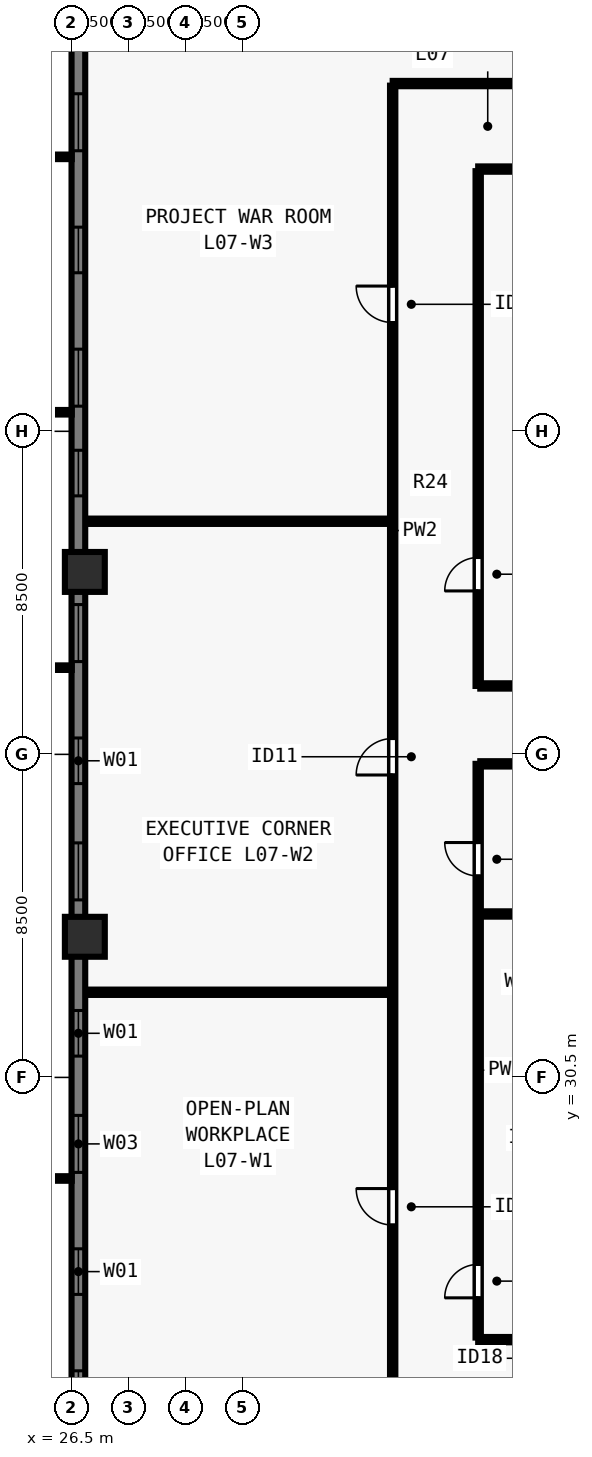
"""IFC4 building model, lengths in metres.
Left out: names, types, materials, properties, quantities, classifications, styles, units other than length and angle.
Written with IfcOpenShell. Run it as: python <this file> out.ifc"""

import sys

from ifc_helpers import new_model, si_unit, direction, frame, frame_2d, origin, origin_2d, place, context, subcontext, project, spatial, rectangle, extrude, element, fill, save


model = new_model("IFC4")
c1 = context("Model", 3, precision=1e-05, world=origin(), true_north=direction((0.0, 1.0)))
c2 = subcontext(c1, "Body", "Model", "MODEL_VIEW")
j1 = project(units=[si_unit("LENGTHUNIT", "METRE"), si_unit("PLANEANGLEUNIT", "RADIAN")], contexts=[c1])
p1 = place(None, origin())
s1 = spatial("IfcSite", under=j1, at=p1, CompositionType="ELEMENT")
p2 = place(p1, origin())
s2 = spatial("IfcBuilding", under=s1, at=p2, CompositionType="ELEMENT")
p3 = place(p2, frame((0.0, 0.0, 30.5)))
s3 = spatial("IfcBuildingStorey", under=s2, at=p3, CompositionType="ELEMENT", Elevation=30.5)
for number, where, z_axis, x_axis in (
    (1, (26.85, 43.8, 0.0), (0.0, 0.0, 1.0), (0.0, 1.0, 0.0)),
    (2, (26.85, 34.2, 0.0), (0.0, 0.0, 1.0), (0.0, 1.0, 0.0)),
):
    element("IfcColumn", number, at=place(p3, frame(where, z_axis=z_axis, x_axis=x_axis)), inside=s3, PredefinedType="COLUMN", context=c2, shape_type="SweptSolid", body=[
        extrude(rectangle(XDim=1.05, YDim=1.05, at=origin_2d()), origin(), (0.0, 0.0, 1.0), 3.5),
    ])
p4 = place(p3, frame((26.68, 16.5, 0.0), z_axis=(0.0, 0.0, 1.0), x_axis=(0.0, 1.0, 0.0)))
e3 = element("IfcWall", 3, at=p4, inside=s3, PredefinedType="SOLIDWALL", context=c2, shape_type="SweptSolid", body=[
    extrude(rectangle(XDim=44.662, YDim=0.36, at=frame_2d((22.331, 0.0))), origin(), (0.0, 0.0, 1.0), 3.28),
])
p5 = place(p4, frame((4.78, 0.0, 0.8)))
e4 = element("IfcOpeningElement", 4, at=p5, cuts=e3, PredefinedType="OPENING", context=c2, shape_type="SweptSolid", body=[
    extrude(rectangle(XDim=1.5, YDim=1.544, at=frame_2d((0.75, 0.772))), frame((0.0, 0.19, 0.0), z_axis=(0.0, -1.0, 0.0), x_axis=(1.0, 0.0, 0.0)), (0.0, 0.0, 1.0), 0.38),
])
p6 = place(p4, frame((8.29, 0.0, 0.8)))
e5 = element("IfcOpeningElement", 5, at=p6, cuts=e3, PredefinedType="OPENING", context=c2, shape_type="SweptSolid", body=[
    extrude(rectangle(XDim=1.2, YDim=1.544, at=frame_2d((0.6, 0.772))), frame((0.0, 0.19, 0.0), z_axis=(0.0, -1.0, 0.0), x_axis=(1.0, 0.0, 0.0)), (0.0, 0.0, 1.0), 0.38),
])
p7 = place(p4, frame((11.5, 0.0, 0.8)))
e6 = element("IfcOpeningElement", 6, at=p7, cuts=e3, PredefinedType="OPENING", context=c2, shape_type="SweptSolid", body=[
    extrude(rectangle(XDim=1.5, YDim=1.544, at=frame_2d((0.75, 0.772))), frame((0.0, 0.19, 0.0), z_axis=(0.0, -1.0, 0.0), x_axis=(1.0, 0.0, 0.0)), (0.0, 0.0, 1.0), 0.38),
])
p8 = place(p4, frame((14.561, 0.0, 0.8)))
e7 = element("IfcOpeningElement", 7, at=p8, cuts=e3, PredefinedType="OPENING", context=c2, shape_type="SweptSolid", body=[
    extrude(rectangle(XDim=1.2, YDim=1.544, at=frame_2d((0.6, 0.772))), frame((0.0, 0.19, 0.0), z_axis=(0.0, -1.0, 0.0), x_axis=(1.0, 0.0, 0.0)), (0.0, 0.0, 1.0), 0.38),
])
p9 = place(p4, frame((18.671, 0.0, 0.8)))
e8 = element("IfcOpeningElement", 8, at=p9, cuts=e3, PredefinedType="OPENING", context=c2, shape_type="SweptSolid", body=[
    extrude(rectangle(XDim=1.5, YDim=1.544, at=frame_2d((0.75, 0.772))), frame((0.0, 0.19, 0.0), z_axis=(0.0, -1.0, 0.0), x_axis=(1.0, 0.0, 0.0)), (0.0, 0.0, 1.0), 0.38),
])
p10 = place(p4, frame((21.731, 0.0, 0.8)))
e9 = element("IfcOpeningElement", 9, at=p10, cuts=e3, PredefinedType="OPENING", context=c2, shape_type="SweptSolid", body=[
    extrude(rectangle(XDim=1.2, YDim=1.544, at=frame_2d((0.6, 0.772))), frame((0.0, 0.19, 0.0), z_axis=(0.0, -1.0, 0.0), x_axis=(1.0, 0.0, 0.0)), (0.0, 0.0, 1.0), 0.38),
])
p11 = place(p4, frame((24.941, 0.0, 0.8)))
e10 = element("IfcOpeningElement", 10, at=p11, cuts=e3, PredefinedType="OPENING", context=c2, shape_type="SweptSolid", body=[
    extrude(rectangle(XDim=1.5, YDim=1.544, at=frame_2d((0.75, 0.772))), frame((0.0, 0.19, 0.0), z_axis=(0.0, -1.0, 0.0), x_axis=(1.0, 0.0, 0.0)), (0.0, 0.0, 1.0), 0.38),
])
p12 = place(p4, frame((29.302, 0.0, 0.8)))
e11 = element("IfcOpeningElement", 11, at=p12, cuts=e3, PredefinedType="OPENING", context=c2, shape_type="SweptSolid", body=[
    extrude(rectangle(XDim=1.2, YDim=1.544, at=frame_2d((0.6, 0.772))), frame((0.0, 0.19, 0.0), z_axis=(0.0, -1.0, 0.0), x_axis=(1.0, 0.0, 0.0)), (0.0, 0.0, 1.0), 0.38),
])
p13 = place(p4, frame((31.662, 0.0, 0.8)))
e12 = element("IfcOpeningElement", 12, at=p13, cuts=e3, PredefinedType="OPENING", context=c2, shape_type="SweptSolid", body=[
    extrude(rectangle(XDim=1.5, YDim=1.544, at=frame_2d((0.75, 0.772))), frame((0.0, 0.19, 0.0), z_axis=(0.0, -1.0, 0.0), x_axis=(1.0, 0.0, 0.0)), (0.0, 0.0, 1.0), 0.38),
])
p14 = place(p4, frame((35.172, 0.0, 0.8)))
e13 = element("IfcOpeningElement", 13, at=p14, cuts=e3, PredefinedType="OPENING", context=c2, shape_type="SweptSolid", body=[
    extrude(rectangle(XDim=1.2, YDim=1.544, at=frame_2d((0.6, 0.772))), frame((0.0, 0.19, 0.0), z_axis=(0.0, -1.0, 0.0), x_axis=(1.0, 0.0, 0.0)), (0.0, 0.0, 1.0), 0.38),
])
p15 = place(p4, frame((38.382, 0.0, 0.8)))
e14 = element("IfcOpeningElement", 14, at=p15, cuts=e3, PredefinedType="OPENING", context=c2, shape_type="SweptSolid", body=[
    extrude(rectangle(XDim=1.5, YDim=1.544, at=frame_2d((0.75, 0.772))), frame((0.0, 0.19, 0.0), z_axis=(0.0, -1.0, 0.0), x_axis=(1.0, 0.0, 0.0)), (0.0, 0.0, 1.0), 0.38),
])
p16 = place(p3, frame((34.95, 56.65, 0.0), z_axis=(0.0, 0.0, 1.0), x_axis=(1.0, 0.0, 0.0)))
e15 = element("IfcWall", 15, at=p16, inside=s3, PredefinedType="PARTITIONING", context=c2, shape_type="SweptSolid", body=[
    extrude(rectangle(XDim=34.1, YDim=0.14, at=frame_2d((17.05, 0.0))), origin(), (0.0, 0.0, 1.0), 3.28),
])
p17 = place(p16, frame((4.522, 0.0, 0.0)))
e16 = element("IfcOpeningElement", 16, at=p17, cuts=e15, PredefinedType="OPENING", context=c2, shape_type="SweptSolid", body=[
    extrude(rectangle(XDim=0.96, YDim=2.12, at=frame_2d((0.48, 1.06))), frame((0.0, 0.08, 0.0), z_axis=(0.0, -1.0, 0.0), x_axis=(1.0, 0.0, 0.0)), (0.0, 0.0, 1.0), 0.16),
])
p18 = place(p16, frame((29.202, 0.0, 0.0)))
e17 = element("IfcOpeningElement", 17, at=p18, cuts=e15, PredefinedType="OPENING", context=c2, shape_type="SweptSolid", body=[
    extrude(rectangle(XDim=0.96, YDim=2.12, at=frame_2d((0.48, 1.06))), frame((0.0, 0.08, 0.0), z_axis=(0.0, -1.0, 0.0), x_axis=(1.0, 0.0, 0.0)), (0.0, 0.0, 1.0), 0.16),
])
p19 = place(p3, frame((34.95, 21.405, 0.0), z_axis=(0.0, 0.0, 1.0), x_axis=(0.0, 1.0, 0.0)))
e18 = element("IfcWall", 18, at=p19, inside=s3, PredefinedType="PARTITIONING", context=c2, shape_type="SweptSolid", body=[
    extrude(rectangle(XDim=35.19, YDim=0.14, at=frame_2d((17.595, 0.0))), origin(), (0.0, 0.0, 1.0), 3.28),
])
p20 = place(p19, frame((5.21, 0.0, 0.0)))
e19 = element("IfcOpeningElement", 19, at=p20, cuts=e18, PredefinedType="OPENING", context=c2, shape_type="SweptSolid", body=[
    extrude(rectangle(XDim=0.96, YDim=2.12, at=frame_2d((0.48, 1.06))), frame((0.0, 0.08, 0.0), z_axis=(0.0, -1.0, 0.0), x_axis=(1.0, 0.0, 0.0)), (0.0, 0.0, 1.0), 0.16),
])
p21 = place(p19, frame((17.052, 0.0, 0.0)))
e20 = element("IfcOpeningElement", 20, at=p21, cuts=e18, PredefinedType="OPENING", context=c2, shape_type="SweptSolid", body=[
    extrude(rectangle(XDim=0.96, YDim=2.12, at=frame_2d((0.48, 1.06))), frame((0.0, 0.08, 0.0), z_axis=(0.0, -1.0, 0.0), x_axis=(1.0, 0.0, 0.0)), (0.0, 0.0, 1.0), 0.16),
])
p22 = place(p19, frame((28.957, 0.0, 0.0)))
e21 = element("IfcOpeningElement", 21, at=p22, cuts=e18, PredefinedType="OPENING", context=c2, shape_type="SweptSolid", body=[
    extrude(rectangle(XDim=0.96, YDim=2.12, at=frame_2d((0.48, 1.06))), frame((0.0, 0.08, 0.0), z_axis=(0.0, -1.0, 0.0), x_axis=(1.0, 0.0, 0.0)), (0.0, 0.0, 1.0), 0.16),
])
p23 = place(p3, frame((37.2, 23.6, 0.0), z_axis=(0.0, 0.0, 1.0), x_axis=(1.0, 0.0, 0.0)))
e22 = element("IfcWall", 22, at=p23, inside=s3, PredefinedType="PARTITIONING", context=c2, shape_type="SweptSolid", body=[
    extrude(rectangle(XDim=29.6, YDim=0.14, at=frame_2d((14.8, 0.0))), origin(), (0.0, 0.0, 1.0), 3.28),
])
p24 = place(p23, frame((1.2, 0.0, 0.0)))
e23 = element("IfcOpeningElement", 23, at=p24, cuts=e22, PredefinedType="OPENING", context=c2, shape_type="SweptSolid", body=[
    extrude(rectangle(XDim=0.88, YDim=2.1, at=frame_2d((0.44, 1.05))), frame((0.0, 0.08, 0.0), z_axis=(0.0, -1.0, 0.0), x_axis=(1.0, 0.0, 0.0)), (0.0, 0.0, 1.0), 0.16),
])
p25 = place(p23, frame((11.3, 0.0, 0.0)))
e24 = element("IfcOpeningElement", 24, at=p25, cuts=e22, PredefinedType="OPENING", context=c2, shape_type="SweptSolid", body=[
    extrude(rectangle(XDim=0.88, YDim=2.1, at=frame_2d((0.44, 1.05))), frame((0.0, 0.08, 0.0), z_axis=(0.0, -1.0, 0.0), x_axis=(1.0, 0.0, 0.0)), (0.0, 0.0, 1.0), 0.16),
])
p26 = place(p23, frame((21.8, 0.0, 0.0)))
e25 = element("IfcOpeningElement", 25, at=p26, cuts=e22, PredefinedType="OPENING", context=c2, shape_type="SweptSolid", body=[
    extrude(rectangle(XDim=0.88, YDim=2.1, at=frame_2d((0.44, 1.05))), frame((0.0, 0.08, 0.0), z_axis=(0.0, -1.0, 0.0), x_axis=(1.0, 0.0, 0.0)), (0.0, 0.0, 1.0), 0.16),
])
p27 = place(p3, frame((37.2, 54.4, 0.0), z_axis=(0.0, 0.0, 1.0), x_axis=(1.0, 0.0, 0.0)))
e26 = element("IfcWall", 26, at=p27, inside=s3, PredefinedType="PARTITIONING", context=c2, shape_type="SweptSolid", body=[
    extrude(rectangle(XDim=29.6, YDim=0.14, at=frame_2d((14.8, 0.0))), origin(), (0.0, 0.0, 1.0), 3.28),
])
p28 = place(p27, frame((2.2, 0.0, 0.0)))
e27 = element("IfcOpeningElement", 27, at=p28, cuts=e26, PredefinedType="OPENING", context=c2, shape_type="SweptSolid", body=[
    extrude(rectangle(XDim=0.88, YDim=2.1, at=frame_2d((0.44, 1.05))), frame((0.0, 0.08, 0.0), z_axis=(0.0, -1.0, 0.0), x_axis=(1.0, 0.0, 0.0)), (0.0, 0.0, 1.0), 0.16),
])
p29 = place(p27, frame((15.3, 0.0, 0.0)))
e28 = element("IfcOpeningElement", 28, at=p29, cuts=e26, PredefinedType="OPENING", context=c2, shape_type="SweptSolid", body=[
    extrude(rectangle(XDim=0.88, YDim=2.1, at=frame_2d((0.44, 1.05))), frame((0.0, 0.08, 0.0), z_axis=(0.0, -1.0, 0.0), x_axis=(1.0, 0.0, 0.0)), (0.0, 0.0, 1.0), 0.16),
])
p30 = place(p27, frame((24.8, 0.0, 0.0)))
e29 = element("IfcOpeningElement", 29, at=p30, cuts=e26, PredefinedType="OPENING", context=c2, shape_type="SweptSolid", body=[
    extrude(rectangle(XDim=0.88, YDim=2.1, at=frame_2d((0.44, 1.05))), frame((0.0, 0.08, 0.0), z_axis=(0.0, -1.0, 0.0), x_axis=(1.0, 0.0, 0.0)), (0.0, 0.0, 1.0), 0.16),
])
p31 = place(p3, frame((37.2, 23.655, 0.0), z_axis=(0.0, 0.0, 1.0), x_axis=(0.0, 1.0, 0.0)))
e30 = element("IfcWall", 30, at=p31, inside=s3, PredefinedType="PARTITIONING", context=c2, shape_type="SweptSolid", body=[
    extrude(rectangle(XDim=15.095, YDim=0.14, at=frame_2d((7.547, 0.0))), origin(), (0.0, 0.0, 1.0), 3.28),
])
p32 = place(p31, frame((1.045, 0.0, 0.0)))
e31 = element("IfcOpeningElement", 31, at=p32, cuts=e30, PredefinedType="OPENING", context=c2, shape_type="SweptSolid", body=[
    extrude(rectangle(XDim=0.88, YDim=2.1, at=frame_2d((0.44, 1.05))), frame((0.0, 0.08, 0.0), z_axis=(0.0, -1.0, 0.0), x_axis=(1.0, 0.0, 0.0)), (0.0, 0.0, 1.0), 0.16),
])
p33 = place(p31, frame((12.145, 0.0, 0.0)))
e32 = element("IfcOpeningElement", 32, at=p33, cuts=e30, PredefinedType="OPENING", context=c2, shape_type="SweptSolid", body=[
    extrude(rectangle(XDim=0.88, YDim=2.1, at=frame_2d((0.44, 1.05))), frame((0.0, 0.08, 0.0), z_axis=(0.0, -1.0, 0.0), x_axis=(1.0, 0.0, 0.0)), (0.0, 0.0, 1.0), 0.16),
])
p34 = place(p3, frame((37.2, 40.8, 0.0), z_axis=(0.0, 0.0, 1.0), x_axis=(0.0, 1.0, 0.0)))
e33 = element("IfcWall", 33, at=p34, inside=s3, PredefinedType="PARTITIONING", context=c2, shape_type="SweptSolid", body=[
    extrude(rectangle(XDim=13.545, YDim=0.14, at=frame_2d((6.772, 0.0))), origin(), (0.0, 0.0, 1.0), 3.28),
])
p35 = place(p34, frame((2.5, 0.0, 0.0)))
e34 = element("IfcOpeningElement", 34, at=p35, cuts=e33, PredefinedType="OPENING", context=c2, shape_type="SweptSolid", body=[
    extrude(rectangle(XDim=0.88, YDim=2.1, at=frame_2d((0.44, 1.05))), frame((0.0, 0.08, 0.0), z_axis=(0.0, -1.0, 0.0), x_axis=(1.0, 0.0, 0.0)), (0.0, 0.0, 1.0), 0.16),
])
for number, where, z_axis, x_axis in (
    (35, (37.255, 38.75, 0.0), (0.0, 0.0, 1.0), (1.0, 0.0, 0.0)),
    (36, (37.255, 40.8, 0.0), (0.0, 0.0, 1.0), (1.0, 0.0, 0.0)),
    (37, (37.255, 34.8, 0.0), (0.0, 0.0, 1.0), (1.0, 0.0, 0.0)),
):
    element("IfcWall", number, at=place(p3, frame(where, z_axis=z_axis, x_axis=x_axis)), inside=s3, PredefinedType="PARTITIONING", context=c2, shape_type="SweptSolid", body=[
        extrude(rectangle(XDim=5.985, YDim=0.14, at=frame_2d((2.993, 0.0))), origin(), (0.0, 0.0, 1.0), 3.28),
    ])
for number, where, z_axis, x_axis in (
    (38, (26.92, 32.74, 0.0), (0.0, 0.0, 1.0), (1.0, 0.0, 0.0)),
    (39, (26.92, 45.134, 0.0), (0.0, 0.0, 1.0), (1.0, 0.0, 0.0)),
):
    element("IfcWall", number, at=place(p3, frame(where, z_axis=z_axis, x_axis=x_axis)), inside=s3, PredefinedType="PARTITIONING", context=c2, shape_type="SweptSolid", body=[
        extrude(rectangle(XDim=7.93, YDim=0.14, at=frame_2d((3.965, 0.0))), origin(), (0.0, 0.0, 1.0), 2.439),
    ])
p36 = place(p5, origin())
e40 = element("IfcWindow", 40, at=p36, inside=s3, PartitioningType="SINGLE_PANEL", PredefinedType="WINDOW", context=c2, shape_type="SweptSolid", body=[
    extrude(rectangle(XDim=1.5, YDim=1.544, at=frame_2d((0.75, 0.772))), frame((0.0, -0.05, 0.0), z_axis=(0.0, -1.0, 0.0), x_axis=(1.0, 0.0, 0.0)), (0.0, 0.0, 1.0), 0.06),
])
fill(e4, e40)
p37 = place(p6, origin())
e41 = element("IfcWindow", 41, at=p37, inside=s3, PartitioningType="SINGLE_PANEL", PredefinedType="WINDOW", context=c2, shape_type="SweptSolid", body=[
    extrude(rectangle(XDim=1.2, YDim=1.544, at=frame_2d((0.6, 0.772))), frame((0.0, -0.05, 0.0), z_axis=(0.0, -1.0, 0.0), x_axis=(1.0, 0.0, 0.0)), (0.0, 0.0, 1.0), 0.06),
])
fill(e5, e41)
p38 = place(p7, origin())
e42 = element("IfcWindow", 42, at=p38, inside=s3, PartitioningType="SINGLE_PANEL", PredefinedType="WINDOW", context=c2, shape_type="SweptSolid", body=[
    extrude(rectangle(XDim=1.5, YDim=1.544, at=frame_2d((0.75, 0.772))), frame((0.0, -0.05, 0.0), z_axis=(0.0, -1.0, 0.0), x_axis=(1.0, 0.0, 0.0)), (0.0, 0.0, 1.0), 0.06),
])
fill(e6, e42)
p39 = place(p8, origin())
e43 = element("IfcWindow", 43, at=p39, inside=s3, PartitioningType="SINGLE_PANEL", PredefinedType="WINDOW", context=c2, shape_type="SweptSolid", body=[
    extrude(rectangle(XDim=1.2, YDim=1.544, at=frame_2d((0.6, 0.772))), frame((0.0, -0.05, 0.0), z_axis=(0.0, -1.0, 0.0), x_axis=(1.0, 0.0, 0.0)), (0.0, 0.0, 1.0), 0.06),
])
fill(e7, e43)
p40 = place(p9, origin())
e44 = element("IfcWindow", 44, at=p40, inside=s3, PartitioningType="SINGLE_PANEL", PredefinedType="WINDOW", context=c2, shape_type="SweptSolid", body=[
    extrude(rectangle(XDim=1.5, YDim=1.544, at=frame_2d((0.75, 0.772))), frame((0.0, -0.05, 0.0), z_axis=(0.0, -1.0, 0.0), x_axis=(1.0, 0.0, 0.0)), (0.0, 0.0, 1.0), 0.06),
])
fill(e8, e44)
p41 = place(p10, origin())
e45 = element("IfcWindow", 45, at=p41, inside=s3, PartitioningType="SINGLE_PANEL", PredefinedType="WINDOW", context=c2, shape_type="SweptSolid", body=[
    extrude(rectangle(XDim=1.2, YDim=1.544, at=frame_2d((0.6, 0.772))), frame((0.0, -0.05, 0.0), z_axis=(0.0, -1.0, 0.0), x_axis=(1.0, 0.0, 0.0)), (0.0, 0.0, 1.0), 0.06),
])
fill(e9, e45)
p42 = place(p11, origin())
e46 = element("IfcWindow", 46, at=p42, inside=s3, PartitioningType="SINGLE_PANEL", PredefinedType="WINDOW", context=c2, shape_type="SweptSolid", body=[
    extrude(rectangle(XDim=1.5, YDim=1.544, at=frame_2d((0.75, 0.772))), frame((0.0, -0.05, 0.0), z_axis=(0.0, -1.0, 0.0), x_axis=(1.0, 0.0, 0.0)), (0.0, 0.0, 1.0), 0.06),
])
fill(e10, e46)
p43 = place(p12, origin())
e47 = element("IfcWindow", 47, at=p43, inside=s3, PartitioningType="SINGLE_PANEL", PredefinedType="WINDOW", context=c2, shape_type="SweptSolid", body=[
    extrude(rectangle(XDim=1.2, YDim=1.544, at=frame_2d((0.6, 0.772))), frame((0.0, -0.05, 0.0), z_axis=(0.0, -1.0, 0.0), x_axis=(1.0, 0.0, 0.0)), (0.0, 0.0, 1.0), 0.06),
])
fill(e11, e47)
p44 = place(p13, origin())
e48 = element("IfcWindow", 48, at=p44, inside=s3, PartitioningType="SINGLE_PANEL", PredefinedType="WINDOW", context=c2, shape_type="SweptSolid", body=[
    extrude(rectangle(XDim=1.5, YDim=1.544, at=frame_2d((0.75, 0.772))), frame((0.0, -0.05, 0.0), z_axis=(0.0, -1.0, 0.0), x_axis=(1.0, 0.0, 0.0)), (0.0, 0.0, 1.0), 0.06),
])
fill(e12, e48)
p45 = place(p14, origin())
e49 = element("IfcWindow", 49, at=p45, inside=s3, PartitioningType="SINGLE_PANEL", PredefinedType="WINDOW", context=c2, shape_type="SweptSolid", body=[
    extrude(rectangle(XDim=1.2, YDim=1.544, at=frame_2d((0.6, 0.772))), frame((0.0, -0.05, 0.0), z_axis=(0.0, -1.0, 0.0), x_axis=(1.0, 0.0, 0.0)), (0.0, 0.0, 1.0), 0.06),
])
fill(e13, e49)
p46 = place(p15, origin())
e50 = element("IfcWindow", 50, at=p46, inside=s3, PartitioningType="SINGLE_PANEL", PredefinedType="WINDOW", context=c2, shape_type="SweptSolid", body=[
    extrude(rectangle(XDim=1.5, YDim=1.544, at=frame_2d((0.75, 0.772))), frame((0.0, -0.05, 0.0), z_axis=(0.0, -1.0, 0.0), x_axis=(1.0, 0.0, 0.0)), (0.0, 0.0, 1.0), 0.06),
])
fill(e14, e50)
p47 = place(p32, origin())
e51 = element("IfcDoor", 51, at=p47, inside=s3, OperationType="SINGLE_SWING_LEFT", PredefinedType="DOOR", context=c2, shape_type="SweptSolid", body=[
    extrude(rectangle(XDim=0.88, YDim=2.1, at=frame_2d((0.44, 1.05))), frame((0.0, 0.025, 0.0), z_axis=(0.0, -1.0, 0.0), x_axis=(1.0, 0.0, 0.0)), (0.0, 0.0, 1.0), 0.05),
])
fill(e31, e51)
p48 = place(p33, origin())
e52 = element("IfcDoor", 52, at=p48, inside=s3, OperationType="SINGLE_SWING_RIGHT", PredefinedType="DOOR", context=c2, shape_type="SweptSolid", body=[
    extrude(rectangle(XDim=0.88, YDim=2.1, at=frame_2d((0.44, 1.05))), frame((0.0, 0.025, 0.0), z_axis=(0.0, -1.0, 0.0), x_axis=(1.0, 0.0, 0.0)), (0.0, 0.0, 1.0), 0.05),
])
fill(e32, e52)
p49 = place(p35, origin())
e53 = element("IfcDoor", 53, at=p49, inside=s3, OperationType="SINGLE_SWING_LEFT", PredefinedType="DOOR", context=c2, shape_type="SweptSolid", body=[
    extrude(rectangle(XDim=0.88, YDim=2.1, at=frame_2d((0.44, 1.05))), frame((0.0, 0.025, 0.0), z_axis=(0.0, -1.0, 0.0), x_axis=(1.0, 0.0, 0.0)), (0.0, 0.0, 1.0), 0.05),
])
fill(e34, e53)
p50 = place(p20, origin())
e54 = element("IfcDoor", 54, at=p50, inside=s3, OperationType="SINGLE_SWING_RIGHT", PredefinedType="DOOR", context=c2, shape_type="SweptSolid", body=[
    extrude(rectangle(XDim=0.96, YDim=2.12, at=frame_2d((0.48, 1.06))), frame((0.0, 0.025, 0.0), z_axis=(0.0, -1.0, 0.0), x_axis=(1.0, 0.0, 0.0)), (0.0, 0.0, 1.0), 0.05),
])
fill(e19, e54)
p51 = place(p21, origin())
e55 = element("IfcDoor", 55, at=p51, inside=s3, OperationType="SINGLE_SWING_LEFT", PredefinedType="DOOR", context=c2, shape_type="SweptSolid", body=[
    extrude(rectangle(XDim=0.96, YDim=2.12, at=frame_2d((0.48, 1.06))), frame((0.0, 0.025, 0.0), z_axis=(0.0, -1.0, 0.0), x_axis=(1.0, 0.0, 0.0)), (0.0, 0.0, 1.0), 0.05),
])
fill(e20, e55)
p52 = place(p22, origin())
e56 = element("IfcDoor", 56, at=p52, inside=s3, OperationType="SINGLE_SWING_RIGHT", PredefinedType="DOOR", context=c2, shape_type="SweptSolid", body=[
    extrude(rectangle(XDim=0.96, YDim=2.12, at=frame_2d((0.48, 1.06))), frame((0.0, 0.025, 0.0), z_axis=(0.0, -1.0, 0.0), x_axis=(1.0, 0.0, 0.0)), (0.0, 0.0, 1.0), 0.05),
])
fill(e21, e56)
save(model, sys.argv[1])
